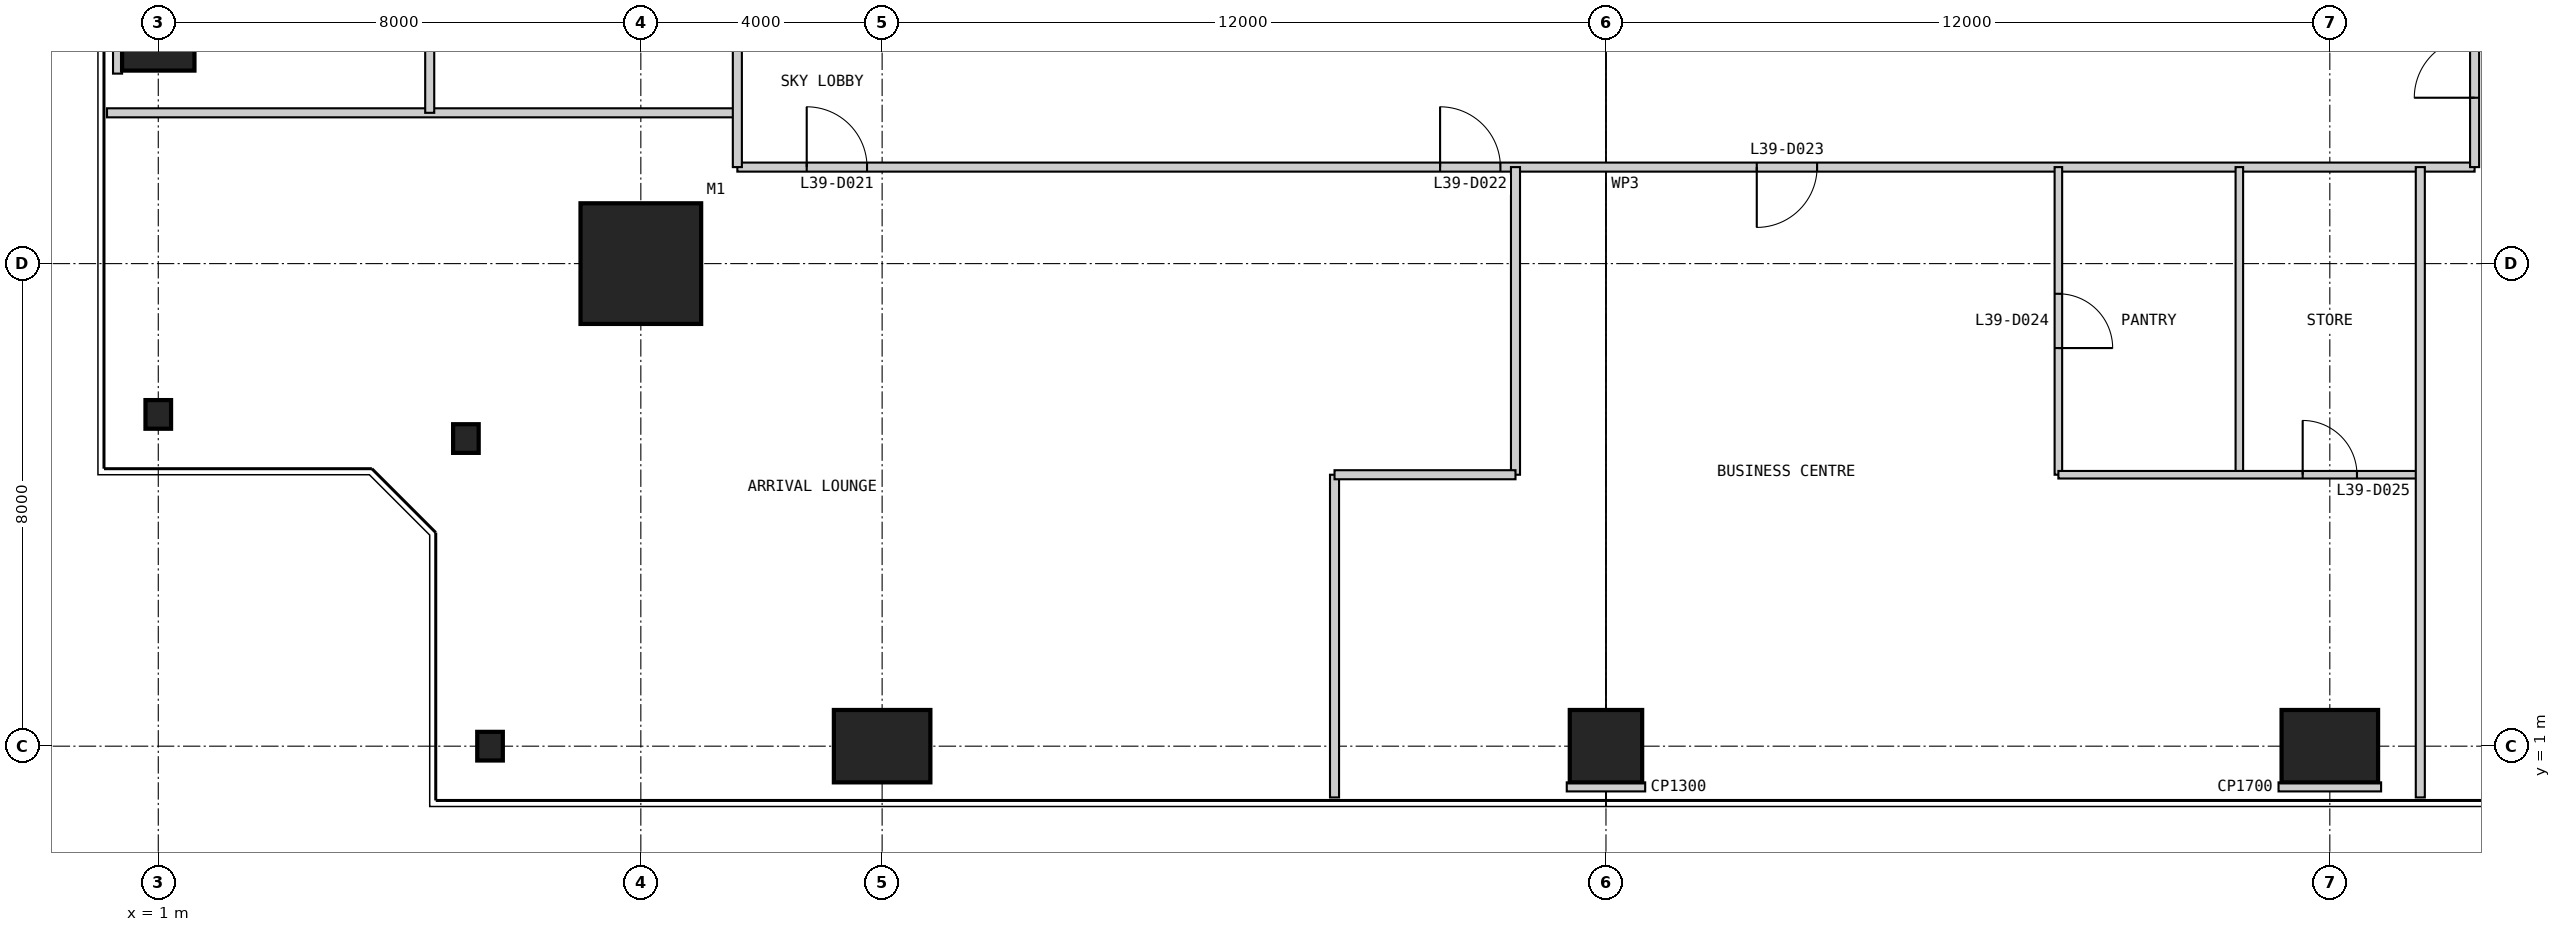
"""IFC4 building model, lengths in metres.
Left out: names, types, materials, properties, quantities, classifications, styles, units other than length and angle.
Written with IfcOpenShell. Run it as: python <this file> out.ifc"""

import sys

from ifc_helpers import new_model, si_unit, direction, frame, frame_2d, origin, origin_2d, place, context, subcontext, project, spatial, rectangle, i_section, extrude, element, fill, save


model = new_model("IFC4")
c1 = context("Model", 3, precision=1e-05, world=origin(), true_north=direction((0.0, 1.0)))
c2 = subcontext(c1, "Body", "Model", "MODEL_VIEW")
j1 = project(units=[si_unit("LENGTHUNIT", "METRE"), si_unit("PLANEANGLEUNIT", "RADIAN")], contexts=[c1])
p1 = place(None, origin())
s1 = spatial("IfcSite", under=j1, at=p1, CompositionType="ELEMENT")
p2 = place(p1, origin())
s2 = spatial("IfcBuilding", under=s1, at=p2, CompositionType="ELEMENT")
p3 = place(p2, frame((0.0, 0.0, 168.4)))
s3 = spatial("IfcBuildingStorey", under=s2, at=p3, CompositionType="ELEMENT", Elevation=168.4)
p4 = place(p3, frame((9.0, 9.0, 0.0), z_axis=(0.0, 0.0, 1.0), x_axis=(1.0, 0.0, 0.0)))
e1 = element("IfcColumn", 1, at=p4, inside=s3, PredefinedType="COLUMN", context=c2, shape_type="SweptSolid", body=[
    extrude(rectangle(XDim=2.0, YDim=2.0, at=origin_2d()), origin(), (0.0, 0.0, 1.0), 5.4),
])
p5 = place(p3, frame((6.5, 1.0, 0.0), z_axis=(0.0, 0.0, 1.0), x_axis=(1.0, 0.0, 0.0)))
e2 = element("IfcColumn", 2, at=p5, inside=s3, PredefinedType="COLUMN", context=c2, shape_type="SweptSolid", body=[
    extrude(i_section(OverallWidth=0.424, OverallDepth=0.475, WebThickness=0.048, FlangeThickness=0.077, at=origin_2d()), origin(), (0.0, 0.0, 1.0), 5.4),
])
p6 = place(p3, frame((13.0, 1.0, 0.0), z_axis=(0.0, 0.0, 1.0), x_axis=(1.0, 0.0, 0.0)))
e3 = element("IfcColumn", 3, at=p6, inside=s3, PredefinedType="COLUMN", context=c2, shape_type="SweptSolid", body=[
    extrude(rectangle(XDim=1.6, YDim=1.2, at=origin_2d()), origin(), (0.0, 0.0, 1.0), 5.4),
])
p7 = place(p3, frame((25.0, 1.0, 0.0), z_axis=(0.0, 0.0, 1.0), x_axis=(1.0, 0.0, 0.0)))
e4 = element("IfcColumn", 4, at=p7, inside=s3, PredefinedType="COLUMN", context=c2, shape_type="SweptSolid", body=[
    extrude(rectangle(XDim=1.2, YDim=1.2, at=origin_2d()), origin(), (0.0, 0.0, 1.0), 5.4),
])
p8 = place(p3, frame((37.0, 1.0, 0.0), z_axis=(0.0, 0.0, 1.0), x_axis=(1.0, 0.0, 0.0)))
e5 = element("IfcColumn", 5, at=p8, inside=s3, PredefinedType="COLUMN", context=c2, shape_type="SweptSolid", body=[
    extrude(rectangle(XDim=1.6, YDim=1.2, at=origin_2d()), origin(), (0.0, 0.0, 1.0), 5.4),
])
p9 = place(p3, frame((1.0, 13.0, 0.0), z_axis=(0.0, 0.0, 1.0), x_axis=(1.0, 0.0, 0.0)))
e6 = element("IfcColumn", 6, at=p9, inside=s3, PredefinedType="COLUMN", context=c2, shape_type="SweptSolid", body=[
    extrude(rectangle(XDim=1.2, YDim=1.6, at=origin_2d()), origin(), (0.0, 0.0, 1.0), 5.4),
])
for number, where, z_axis, x_axis in (
    (7, (1.0, 6.5, 0.0), (0.0, 0.0, 1.0), (1.0, 0.0, 0.0)),
    (8, (6.1, 6.1, 0.0), (0.0, 0.0, 1.0), (1.0, 0.0, 0.0)),
):
    element("IfcColumn", number, at=place(p3, frame(where, z_axis=z_axis, x_axis=x_axis)), inside=s3, PredefinedType="COLUMN", context=c2, shape_type="SweptSolid", body=[
        extrude(i_section(OverallWidth=0.424, OverallDepth=0.475, WebThickness=0.048, FlangeThickness=0.077, at=origin_2d()), origin(), (0.0, 0.0, 1.0), 5.4),
    ])
p10 = place(p3, frame((10.6, 10.6, 0.0), z_axis=(0.0, 0.0, 1.0), x_axis=(1.0, 0.0, 0.0)))
e9 = element("IfcWall", 9, at=p10, inside=s3, PredefinedType="PARTITIONING", context=c2, shape_type="SweptSolid", body=[
    extrude(rectangle(XDim=28.8, YDim=0.15, at=frame_2d((14.4, 0.0))), origin(), (0.0, 0.0, 1.0), 5.25),
])
p11 = place(p10, frame((1.15, 0.0, 0.0)))
e10 = element("IfcOpeningElement", 10, at=p11, cuts=e9, PredefinedType="OPENING", context=c2, shape_type="SweptSolid", body=[
    extrude(rectangle(XDim=1.0, YDim=2.2, at=frame_2d((0.5, 1.1))), frame((0.0, 0.085, 0.0), z_axis=(0.0, -1.0, 0.0), x_axis=(1.0, 0.0, 0.0)), (0.0, 0.0, 1.0), 0.17),
])
p12 = place(p10, frame((11.65, 0.0, 0.0)))
e11 = element("IfcOpeningElement", 11, at=p12, cuts=e9, PredefinedType="OPENING", context=c2, shape_type="SweptSolid", body=[
    extrude(rectangle(XDim=1.0, YDim=2.2, at=frame_2d((0.5, 1.1))), frame((0.0, 0.085, 0.0), z_axis=(0.0, -1.0, 0.0), x_axis=(1.0, 0.0, 0.0)), (0.0, 0.0, 1.0), 0.17),
])
p13 = place(p10, frame((16.9, 0.0, 0.0)))
e12 = element("IfcOpeningElement", 12, at=p13, cuts=e9, PredefinedType="OPENING", context=c2, shape_type="SweptSolid", body=[
    extrude(rectangle(XDim=1.0, YDim=2.2, at=frame_2d((0.5, 1.1))), frame((0.0, 0.085, 0.0), z_axis=(0.0, -1.0, 0.0), x_axis=(1.0, 0.0, 0.0)), (0.0, 0.0, 1.0), 0.17),
])
p14 = place(p3, frame((0.15, 11.5, 0.0), z_axis=(0.0, 0.0, 1.0), x_axis=(1.0, 0.0, 0.0)))
e13 = element("IfcWall", 13, at=p14, inside=s3, PredefinedType="PARTITIONING", context=c2, shape_type="SweptSolid", body=[
    extrude(rectangle(XDim=10.45, YDim=0.15, at=frame_2d((5.225, 0.0))), origin(), (0.0, 0.0, 1.0), 5.25),
])
p15 = place(p3, frame((20.5, 0.15, 0.0), z_axis=(0.0, 0.0, 1.0), x_axis=(0.0, 1.0, 0.0)))
e14 = element("IfcWall", 14, at=p15, inside=s3, PredefinedType="PARTITIONING", context=c2, shape_type="SweptSolid", body=[
    extrude(rectangle(XDim=5.35, YDim=0.15, at=frame_2d((2.675, 0.0))), origin(), (0.0, 0.0, 1.0), 5.25),
])
p16 = place(p3, frame((23.5, 5.5, 0.0), z_axis=(0.0, 0.0, 1.0), x_axis=(0.0, 1.0, 0.0)))
e15 = element("IfcWall", 15, at=p16, inside=s3, PredefinedType="PARTITIONING", context=c2, shape_type="SweptSolid", body=[
    extrude(rectangle(XDim=5.1, YDim=0.15, at=frame_2d((2.55, 0.0))), origin(), (0.0, 0.0, 1.0), 5.25),
])
p17 = place(p3, frame((32.5, 5.5, 0.0), z_axis=(0.0, 0.0, 1.0), x_axis=(0.0, 1.0, 0.0)))
e16 = element("IfcWall", 16, at=p17, inside=s3, PredefinedType="PARTITIONING", context=c2, shape_type="SweptSolid", body=[
    extrude(rectangle(XDim=5.1, YDim=0.125, at=frame_2d((2.55, 0.0))), origin(), (0.0, 0.0, 1.0), 5.25),
])
p18 = place(p17, frame((2.1, 0.0, 0.0)))
e17 = element("IfcOpeningElement", 17, at=p18, cuts=e16, PredefinedType="OPENING", context=c2, shape_type="SweptSolid", body=[
    extrude(rectangle(XDim=0.9, YDim=2.2, at=frame_2d((0.45, 1.1))), frame((0.0, 0.073, 0.0), z_axis=(0.0, -1.0, 0.0), x_axis=(1.0, 0.0, 0.0)), (0.0, 0.0, 1.0), 0.145),
])
p19 = place(p3, frame((35.5, 5.5, 0.0), z_axis=(0.0, 0.0, 1.0), x_axis=(0.0, 1.0, 0.0)))
e18 = element("IfcWall", 18, at=p19, inside=s3, PredefinedType="PARTITIONING", context=c2, shape_type="SweptSolid", body=[
    extrude(rectangle(XDim=5.1, YDim=0.125, at=frame_2d((2.55, 0.0))), origin(), (0.0, 0.0, 1.0), 5.25),
])
p20 = place(p3, frame((20.5, 5.5, 0.0), z_axis=(0.0, 0.0, 1.0), x_axis=(1.0, 0.0, 0.0)))
e19 = element("IfcWall", 19, at=p20, inside=s3, PredefinedType="PARTITIONING", context=c2, shape_type="SweptSolid", body=[
    extrude(rectangle(XDim=3.0, YDim=0.15, at=frame_2d((1.5, 0.0))), origin(), (0.0, 0.0, 1.0), 5.25),
])
p21 = place(p3, frame((32.5, 5.5, 0.0), z_axis=(0.0, 0.0, 1.0), x_axis=(1.0, 0.0, 0.0)))
e20 = element("IfcWall", 20, at=p21, inside=s3, PredefinedType="PARTITIONING", context=c2, shape_type="SweptSolid", body=[
    extrude(rectangle(XDim=6.0, YDim=0.125, at=frame_2d((3.0, 0.0))), origin(), (0.0, 0.0, 1.0), 5.25),
])
p22 = place(p21, frame((4.05, 0.0, 0.0)))
e21 = element("IfcOpeningElement", 21, at=p22, cuts=e20, PredefinedType="OPENING", context=c2, shape_type="SweptSolid", body=[
    extrude(rectangle(XDim=0.9, YDim=2.2, at=frame_2d((0.45, 1.1))), frame((0.0, 0.073, 0.0), z_axis=(0.0, -1.0, 0.0), x_axis=(1.0, 0.0, 0.0)), (0.0, 0.0, 1.0), 0.145),
])
p23 = place(p3, frame((39.4, 10.6, 0.0), z_axis=(0.0, 0.0, 1.0), x_axis=(0.0, 1.0, 0.0)))
e22 = element("IfcWall", 22, at=p23, inside=s3, PredefinedType="PARTITIONING", context=c2, shape_type="SweptSolid", body=[
    extrude(rectangle(XDim=27.9, YDim=0.15, at=frame_2d((13.95, 0.0))), origin(), (0.0, 0.0, 1.0), 5.25),
])
p24 = place(p23, frame((1.15, 0.0, 0.0)))
e23 = element("IfcOpeningElement", 23, at=p24, cuts=e22, PredefinedType="OPENING", context=c2, shape_type="SweptSolid", body=[
    extrude(rectangle(XDim=1.0, YDim=2.2, at=frame_2d((0.5, 1.1))), frame((0.0, 0.085, 0.0), z_axis=(0.0, -1.0, 0.0), x_axis=(1.0, 0.0, 0.0)), (0.0, 0.0, 1.0), 0.17),
])
p25 = place(p23, frame((17.65, 0.0, 0.0)))
e24 = element("IfcOpeningElement", 24, at=p25, cuts=e22, PredefinedType="OPENING", context=c2, shape_type="SweptSolid", body=[
    extrude(rectangle(XDim=1.0, YDim=2.2, at=frame_2d((0.5, 1.1))), frame((0.0, 0.085, 0.0), z_axis=(0.0, -1.0, 0.0), x_axis=(1.0, 0.0, 0.0)), (0.0, 0.0, 1.0), 0.17),
])
p26 = place(p23, frame((24.4, 0.0, 0.0)))
e25 = element("IfcOpeningElement", 25, at=p26, cuts=e22, PredefinedType="OPENING", context=c2, shape_type="SweptSolid", body=[
    extrude(rectangle(XDim=1.0, YDim=2.2, at=frame_2d((0.5, 1.1))), frame((0.0, 0.085, 0.0), z_axis=(0.0, -1.0, 0.0), x_axis=(1.0, 0.0, 0.0)), (0.0, 0.0, 1.0), 0.17),
])
p27 = place(p3, frame((38.5, 0.15, 0.0), z_axis=(0.0, 0.0, 1.0), x_axis=(0.0, 1.0, 0.0)))
e26 = element("IfcWall", 26, at=p27, inside=s3, PredefinedType="PARTITIONING", context=c2, shape_type="SweptSolid", body=[
    extrude(rectangle(XDim=10.45, YDim=0.15, at=frame_2d((5.225, 0.0))), origin(), (0.0, 0.0, 1.0), 5.25),
])
p28 = place(p3, frame((10.6, 38.5, 0.0), z_axis=(0.0, 0.0, 1.0), x_axis=(0.0, -1.0, 0.0)))
e27 = element("IfcWall", 27, at=p28, inside=s3, PredefinedType="PARTITIONING", context=c2, shape_type="SweptSolid", body=[
    extrude(rectangle(XDim=27.9, YDim=0.15, at=frame_2d((13.95, 0.0))), origin(), (0.0, 0.0, 1.0), 5.25),
])
p29 = place(p28, frame((0.25, 0.0, 0.0)))
e28 = element("IfcOpeningElement", 28, at=p29, cuts=e27, PredefinedType="OPENING", context=c2, shape_type="SweptSolid", body=[
    extrude(rectangle(XDim=1.0, YDim=2.2, at=frame_2d((0.5, 1.1))), frame((0.0, 0.085, 0.0), z_axis=(0.0, -1.0, 0.0), x_axis=(1.0, 0.0, 0.0)), (0.0, 0.0, 1.0), 0.17),
])
p30 = place(p28, frame((16.75, 0.0, 0.0)))
e29 = element("IfcOpeningElement", 29, at=p30, cuts=e27, PredefinedType="OPENING", context=c2, shape_type="SweptSolid", body=[
    extrude(rectangle(XDim=1.0, YDim=2.2, at=frame_2d((0.5, 1.1))), frame((0.0, 0.085, 0.0), z_axis=(0.0, -1.0, 0.0), x_axis=(1.0, 0.0, 0.0)), (0.0, 0.0, 1.0), 0.17),
])
p31 = place(p28, frame((23.5, 0.0, 0.0)))
e30 = element("IfcOpeningElement", 30, at=p31, cuts=e27, PredefinedType="OPENING", context=c2, shape_type="SweptSolid", body=[
    extrude(rectangle(XDim=1.0, YDim=2.2, at=frame_2d((0.5, 1.1))), frame((0.0, 0.085, 0.0), z_axis=(0.0, -1.0, 0.0), x_axis=(1.0, 0.0, 0.0)), (0.0, 0.0, 1.0), 0.17),
])
p32 = place(p3, frame((5.5, 17.5, 0.0), z_axis=(0.0, 0.0, 1.0), x_axis=(0.0, -1.0, 0.0)))
e31 = element("IfcWall", 31, at=p32, inside=s3, PredefinedType="PARTITIONING", context=c2, shape_type="SweptSolid", body=[
    extrude(rectangle(XDim=6.0, YDim=0.15, at=frame_2d((3.0, 0.0))), origin(), (0.0, 0.0, 1.0), 5.25),
])
p33 = place(p3, frame((25.0, 0.25, 0.0), z_axis=(0.0, 0.0, 1.0), x_axis=(0.0, 1.0, 0.0)))
e32 = element("IfcWall", 32, at=p33, inside=s3, PredefinedType="PARTITIONING", context=c2, shape_type="SweptSolid", body=[
    extrude(rectangle(XDim=0.15, YDim=1.3, at=frame_2d((0.075, 0.0))), origin(), (0.0, 0.0, 1.0), 5.25),
])
for number, where, z_axis, x_axis in (
    (33, (37.0, 0.25, 0.0), (0.0, 0.0, 1.0), (0.0, 1.0, 0.0)),
    (34, (0.25, 13.0, 0.0), (0.0, 0.0, 1.0), (1.0, 0.0, 0.0)),
):
    element("IfcWall", number, at=place(p3, frame(where, z_axis=z_axis, x_axis=x_axis)), inside=s3, PredefinedType="PARTITIONING", context=c2, shape_type="SweptSolid", body=[
        extrude(rectangle(XDim=0.15, YDim=1.7, at=frame_2d((0.075, 0.0))), origin(), (0.0, 0.0, 1.0), 5.25),
    ])
p34 = place(p11, origin())
e35 = element("IfcDoor", 35, at=p34, inside=s3, OperationType="SINGLE_SWING_LEFT", PredefinedType="DOOR", context=c2, shape_type="SweptSolid", body=[
    extrude(rectangle(XDim=1.0, YDim=2.2, at=frame_2d((0.5, 1.1))), frame((0.0, 0.025, 0.0), z_axis=(0.0, -1.0, 0.0), x_axis=(1.0, 0.0, 0.0)), (0.0, 0.0, 1.0), 0.05),
])
fill(e10, e35)
p35 = place(p12, origin())
e36 = element("IfcDoor", 36, at=p35, inside=s3, OperationType="SINGLE_SWING_LEFT", PredefinedType="DOOR", context=c2, shape_type="SweptSolid", body=[
    extrude(rectangle(XDim=1.0, YDim=2.2, at=frame_2d((0.5, 1.1))), frame((0.0, 0.025, 0.0), z_axis=(0.0, -1.0, 0.0), x_axis=(1.0, 0.0, 0.0)), (0.0, 0.0, 1.0), 0.05),
])
fill(e11, e36)
p36 = place(p13, frame((1.0, 0.0, 0.0), z_axis=(0.0, 0.0, 1.0), x_axis=(-1.0, 0.0, 0.0)))
e37 = element("IfcDoor", 37, at=p36, inside=s3, OperationType="SINGLE_SWING_RIGHT", PredefinedType="DOOR", context=c2, shape_type="SweptSolid", body=[
    extrude(rectangle(XDim=1.0, YDim=2.2, at=frame_2d((0.5, 1.1))), frame((0.0, 0.025, 0.0), z_axis=(0.0, -1.0, 0.0), x_axis=(1.0, 0.0, 0.0)), (0.0, 0.0, 1.0), 0.05),
])
fill(e12, e37)
p37 = place(p18, frame((0.9, 0.0, 0.0), z_axis=(0.0, 0.0, 1.0), x_axis=(-1.0, 0.0, 0.0)))
e38 = element("IfcDoor", 38, at=p37, inside=s3, OperationType="SINGLE_SWING_RIGHT", PredefinedType="DOOR", context=c2, shape_type="SweptSolid", body=[
    extrude(rectangle(XDim=0.9, YDim=2.2, at=frame_2d((0.45, 1.1))), frame((0.0, 0.025, 0.0), z_axis=(0.0, -1.0, 0.0), x_axis=(1.0, 0.0, 0.0)), (0.0, 0.0, 1.0), 0.05),
])
fill(e17, e38)
p38 = place(p22, origin())
e39 = element("IfcDoor", 39, at=p38, inside=s3, OperationType="SINGLE_SWING_LEFT", PredefinedType="DOOR", context=c2, shape_type="SweptSolid", body=[
    extrude(rectangle(XDim=0.9, YDim=2.2, at=frame_2d((0.45, 1.1))), frame((0.0, 0.025, 0.0), z_axis=(0.0, -1.0, 0.0), x_axis=(1.0, 0.0, 0.0)), (0.0, 0.0, 1.0), 0.05),
])
fill(e21, e39)
p39 = place(p24, origin())
e40 = element("IfcDoor", 40, at=p39, inside=s3, OperationType="SINGLE_SWING_LEFT", PredefinedType="DOOR", context=c2, shape_type="SweptSolid", body=[
    extrude(rectangle(XDim=1.0, YDim=2.2, at=frame_2d((0.5, 1.1))), frame((0.0, 0.025, 0.0), z_axis=(0.0, -1.0, 0.0), x_axis=(1.0, 0.0, 0.0)), (0.0, 0.0, 1.0), 0.05),
])
fill(e23, e40)
save(model, sys.argv[1])
